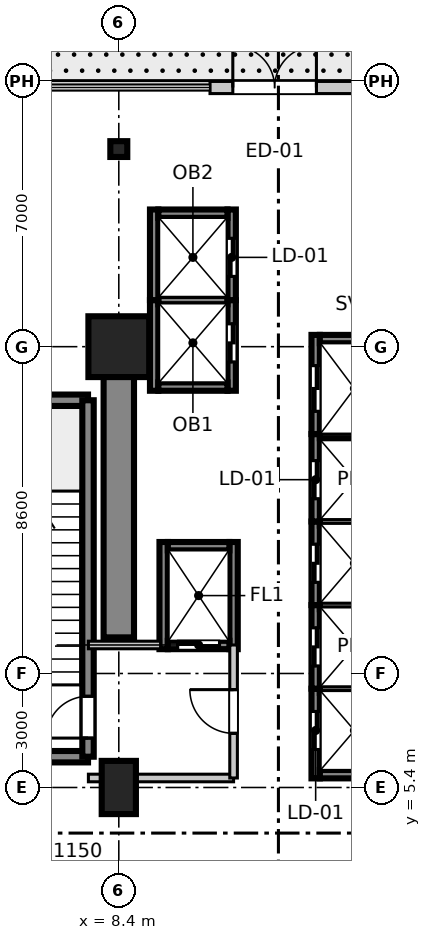
"""IFC4 building model, lengths in metres.
Left out: names, types, materials, properties, quantities, classifications, styles, units other than length and angle.
Written with IfcOpenShell. Run it as: python <this file> out.ifc"""

import sys

from ifc_helpers import new_model, si_unit, direction, frame, frame_2d, origin, origin_2d, place, context, subcontext, project, spatial, rectangle, i_section, extrude, source, transform, mapped, element, fill, save


model = new_model("IFC4")
c1 = context("Model", 3, precision=1e-05, world=origin(), true_north=direction((0.0, 1.0)))
c2 = subcontext(c1, "Body", "Model", "MODEL_VIEW")
j1 = project(units=[si_unit("LENGTHUNIT", "METRE"), si_unit("PLANEANGLEUNIT", "RADIAN")], contexts=[c1])
p1 = place(None, origin())
s1 = spatial("IfcSite", under=j1, at=p1, CompositionType="ELEMENT")
p2 = place(p1, origin())
s2 = spatial("IfcBuilding", under=s1, at=p2, CompositionType="ELEMENT")
p3 = place(p2, origin())
s3 = spatial("IfcBuildingStorey", under=s2, at=p3, CompositionType="ELEMENT", Elevation=0.0)
m1 = source(origin(), c2, "Body", "SweptSolid", [
    extrude(rectangle(XDim=0.9, YDim=1.4, at=origin_2d()), origin(), (0.0, 0.0, 1.0), 5.355),
])
p4 = place(p3, frame((8.4, 5.4, 0.0), z_axis=(0.0, 0.0, 1.0), x_axis=(1.0, 0.0, 0.0)))
e1 = element("IfcColumn", 1, at=p4, inside=s3, PredefinedType="PILASTER", context=c2, shape_type="MappedRepresentation", body=[
    mapped(m1, transform((0.0, 0.0, 0.0), scale=1.0)),
])
m2 = source(origin(), c2, "Body", "SweptSolid", [
    extrude(rectangle(XDim=1.6, YDim=1.6, at=origin_2d()), origin(), (0.0, 0.0, 1.0), 5.355),
])
p5 = place(p3, frame((8.4, 17.0, 0.0), z_axis=(0.0, 0.0, 1.0), x_axis=(1.0, 0.0, 0.0)))
e2 = element("IfcColumn", 2, at=p5, inside=s3, PredefinedType="COLUMN", context=c2, shape_type="MappedRepresentation", body=[
    mapped(m2, transform((0.0, 0.0, 0.0), scale=1.0)),
])
m3 = source(origin(), c2, "Body", "SweptSolid", [
    extrude(i_section(OverallWidth=0.416, OverallDepth=0.446, WebThickness=0.025, FlangeThickness=0.04, at=origin_2d()), origin(), (0.0, 0.0, 1.0), 5.355),
])
p6 = place(p3, frame((8.4, 22.2, 0.0), z_axis=(0.0, 0.0, 1.0), x_axis=(0.0, 1.0, 0.0)))
e3 = element("IfcColumn", 3, at=p6, inside=s3, PredefinedType="COLUMN", context=c2, shape_type="MappedRepresentation", body=[
    mapped(m3, transform((0.0, 0.0, 0.0), scale=1.0)),
])
m4 = source(origin(), c2, "Body", "SweptSolid", [
    extrude(rectangle(XDim=7.65, YDim=0.8, at=frame_2d((3.825, 0.0))), origin(), (0.0, 0.0, 1.0), 5.08),
])
p7 = place(p3, frame((8.4, 9.35, 0.0), z_axis=(0.0, 0.0, 1.0), x_axis=(0.0, 1.0, 0.0)))
e4 = element("IfcWall", 4, at=p7, inside=s3, PredefinedType="SHEAR", context=c2, shape_type="MappedRepresentation", body=[
    mapped(m4, transform((0.0, 0.0, 0.0), scale=1.0)),
])
m5 = source(origin(), c2, "Body", "SweptSolid", [
    extrude(rectangle(XDim=3.98, YDim=0.3, at=frame_2d((1.99, 0.0))), origin(), (0.0, 0.0, 1.0), 5.08),
])
for number, where, z_axis, x_axis in (
    (5, (3.61, 6.21, 0.0), (0.0, 0.0, 1.0), (1.0, 0.0, 0.0)),
    (6, (3.61, 15.59, 0.0), (0.0, 0.0, 1.0), (1.0, 0.0, 0.0)),
):
    element("IfcWall", number, at=place(p3, frame(where, z_axis=z_axis, x_axis=x_axis)), inside=s3, PredefinedType="SHEAR", context=c2, shape_type="MappedRepresentation", body=[
        mapped(m5, transform((0.0, 0.0, 0.0), scale=1.0)),
    ])
m6 = source(origin(), c2, "Body", "SweptSolid", [
    extrude(rectangle(XDim=9.38, YDim=0.3, at=frame_2d((4.69, 0.0))), origin(), (0.0, 0.0, 1.0), 5.08),
])
p8 = place(p3, frame((7.59, 6.21, 0.0), z_axis=(0.0, 0.0, 1.0), x_axis=(0.0, 1.0, 0.0)))
e7 = element("IfcWall", 7, at=p8, inside=s3, PredefinedType="SHEAR", context=c2, shape_type="MappedRepresentation", body=[
    mapped(m6, transform((0.0, 0.0, 0.0), scale=1.0)),
])
p9 = place(p8, frame((0.49, 0.0, 0.0)))
e8 = element("IfcOpeningElement", 8, at=p9, cuts=e7, PredefinedType="OPENING", context=c2, shape_type="SweptSolid", body=[
    extrude(rectangle(XDim=1.1, YDim=2.15, at=frame_2d((0.55, 1.075))), frame((0.0, 0.16, 0.0), z_axis=(0.0, -1.0, 0.0), x_axis=(1.0, 0.0, 0.0)), (0.0, 0.0, 1.0), 0.32),
])
m7 = source(origin(), c2, "Body", "SweptSolid", [
    extrude(rectangle(XDim=2.36, YDim=0.22, at=frame_2d((1.18, 0.0))), origin(), (0.0, 0.0, 1.0), 5.08),
])
p10 = place(p3, frame((13.58, 5.64, 0.0), z_axis=(0.0, 0.0, 1.0), x_axis=(0.0, 1.0, 0.0)))
e9 = element("IfcWall", 9, at=p10, inside=s3, PredefinedType="SHEAR", context=c2, shape_type="MappedRepresentation", body=[
    mapped(m7, transform((0.0, 0.0, 0.0), scale=1.0)),
])
p11 = place(p10, frame((0.76, 0.0, 0.0)))
e10 = element("IfcOpeningElement", 10, at=p11, cuts=e9, PredefinedType="OPENING", context=c2, shape_type="SweptSolid", body=[
    extrude(rectangle(XDim=1.0, YDim=2.2, at=frame_2d((0.5, 1.1))), frame((0.0, 0.12, 0.0), z_axis=(0.0, -1.0, 0.0), x_axis=(1.0, 0.0, 0.0)), (0.0, 0.0, 1.0), 0.24),
])
m8 = source(origin(), c2, "Body", "SweptSolid", [
    extrude(rectangle(XDim=1.82, YDim=0.22, at=frame_2d((0.91, 0.0))), origin(), (0.0, 0.0, 1.0), 5.08),
])
p12 = place(p3, frame((13.69, 5.75, 0.0), z_axis=(0.0, 0.0, 1.0), x_axis=(1.0, 0.0, 0.0)))
e11 = element("IfcWall", 11, at=p12, inside=s3, PredefinedType="SHEAR", context=c2, shape_type="MappedRepresentation", body=[
    mapped(m8, transform((0.0, 0.0, 0.0), scale=1.0)),
])
m9 = source(origin(), c2, "Body", "SweptSolid", [
    extrude(rectangle(XDim=1.82, YDim=0.22, at=frame_2d((0.91, 0.0))), origin(), (0.0, 0.0, 1.0), 5.4),
])
p13 = place(p3, frame((13.69, 8.0, 0.0), z_axis=(0.0, 0.0, 1.0), x_axis=(1.0, 0.0, 0.0)))
e12 = element("IfcWall", 12, at=p13, inside=s3, PredefinedType="SHEAR", context=c2, shape_type="MappedRepresentation", body=[
    mapped(m9, transform((0.0, 0.0, 0.0), scale=1.0)),
])
m10 = source(origin(), c2, "Body", "SweptSolid", [
    extrude(rectangle(XDim=2.2, YDim=0.22, at=frame_2d((1.1, 0.0))), origin(), (0.0, 0.0, 1.0), 5.08),
])
p14 = place(p3, frame((13.58, 8.0, 0.0), z_axis=(0.0, 0.0, 1.0), x_axis=(0.0, 1.0, 0.0)))
e13 = element("IfcWall", 13, at=p14, inside=s3, PredefinedType="SHEAR", context=c2, shape_type="MappedRepresentation", body=[
    mapped(m10, transform((0.0, 0.0, 0.0), scale=1.0)),
])
p15 = place(p14, frame((0.6, 0.0, 0.0)))
e14 = element("IfcOpeningElement", 14, at=p15, cuts=e13, PredefinedType="OPENING", context=c2, shape_type="SweptSolid", body=[
    extrude(rectangle(XDim=1.0, YDim=2.2, at=frame_2d((0.5, 1.1))), frame((0.0, 0.12, 0.0), z_axis=(0.0, -1.0, 0.0), x_axis=(1.0, 0.0, 0.0)), (0.0, 0.0, 1.0), 0.24),
])
p16 = place(p3, frame((13.69, 10.2, 0.0), z_axis=(0.0, 0.0, 1.0), x_axis=(1.0, 0.0, 0.0)))
e15 = element("IfcWall", 15, at=p16, inside=s3, PredefinedType="SHEAR", context=c2, shape_type="MappedRepresentation", body=[
    mapped(m9, transform((0.0, 0.0, 0.0), scale=1.0)),
])
p17 = place(p3, frame((13.58, 10.2, 0.0), z_axis=(0.0, 0.0, 1.0), x_axis=(0.0, 1.0, 0.0)))
e16 = element("IfcWall", 16, at=p17, inside=s3, PredefinedType="SHEAR", context=c2, shape_type="MappedRepresentation", body=[
    mapped(m10, transform((0.0, 0.0, 0.0), scale=1.0)),
])
p18 = place(p17, frame((0.6, 0.0, 0.0)))
e17 = element("IfcOpeningElement", 17, at=p18, cuts=e16, PredefinedType="OPENING", context=c2, shape_type="SweptSolid", body=[
    extrude(rectangle(XDim=1.0, YDim=2.2, at=frame_2d((0.5, 1.1))), frame((0.0, 0.12, 0.0), z_axis=(0.0, -1.0, 0.0), x_axis=(1.0, 0.0, 0.0)), (0.0, 0.0, 1.0), 0.24),
])
p19 = place(p3, frame((13.69, 12.4, 0.0), z_axis=(0.0, 0.0, 1.0), x_axis=(1.0, 0.0, 0.0)))
e18 = element("IfcWall", 18, at=p19, inside=s3, PredefinedType="SHEAR", context=c2, shape_type="MappedRepresentation", body=[
    mapped(m9, transform((0.0, 0.0, 0.0), scale=1.0)),
])
m11 = source(origin(), c2, "Body", "SweptSolid", [
    extrude(rectangle(XDim=2.3, YDim=0.22, at=frame_2d((1.15, 0.0))), origin(), (0.0, 0.0, 1.0), 5.08),
])
p20 = place(p3, frame((13.58, 12.4, 0.0), z_axis=(0.0, 0.0, 1.0), x_axis=(0.0, 1.0, 0.0)))
e19 = element("IfcWall", 19, at=p20, inside=s3, PredefinedType="SHEAR", context=c2, shape_type="MappedRepresentation", body=[
    mapped(m11, transform((0.0, 0.0, 0.0), scale=1.0)),
])
p21 = place(p20, frame((0.6, 0.0, 0.0)))
e20 = element("IfcOpeningElement", 20, at=p21, cuts=e19, PredefinedType="OPENING", context=c2, shape_type="SweptSolid", body=[
    extrude(rectangle(XDim=1.0, YDim=2.2, at=frame_2d((0.5, 1.1))), frame((0.0, 0.12, 0.0), z_axis=(0.0, -1.0, 0.0), x_axis=(1.0, 0.0, 0.0)), (0.0, 0.0, 1.0), 0.24),
])
p22 = place(p3, frame((13.69, 14.7, 0.0), z_axis=(0.0, 0.0, 1.0), x_axis=(1.0, 0.0, 0.0)))
e21 = element("IfcWall", 21, at=p22, inside=s3, PredefinedType="SHEAR", context=c2, shape_type="MappedRepresentation", body=[
    mapped(m9, transform((0.0, 0.0, 0.0), scale=1.0)),
])
m12 = source(origin(), c2, "Body", "SweptSolid", [
    extrude(rectangle(XDim=2.385, YDim=0.22, at=frame_2d((1.192, 0.0))), origin(), (0.0, 0.0, 1.0), 5.08),
])
p23 = place(p3, frame((9.33, 15.84, 0.0), z_axis=(0.0, 0.0, 1.0), x_axis=(0.0, 1.0, 0.0)))
e22 = element("IfcWall", 22, at=p23, inside=s3, PredefinedType="SHEAR", context=c2, shape_type="MappedRepresentation", body=[
    mapped(m12, transform((0.0, 0.0, 0.0), scale=1.0)),
])
p24 = place(p3, frame((11.37, 15.84, 0.0), z_axis=(0.0, 0.0, 1.0), x_axis=(0.0, 1.0, 0.0)))
e23 = element("IfcWall", 23, at=p24, inside=s3, PredefinedType="SHEAR", context=c2, shape_type="MappedRepresentation", body=[
    mapped(m12, transform((0.0, 0.0, 0.0), scale=1.0)),
])
p25 = place(p24, frame((0.76, 0.0, 0.0)))
e24 = element("IfcOpeningElement", 24, at=p25, cuts=e23, PredefinedType="OPENING", context=c2, shape_type="SweptSolid", body=[
    extrude(rectangle(XDim=1.0, YDim=2.2, at=frame_2d((0.5, 1.1))), frame((0.0, 0.12, 0.0), z_axis=(0.0, -1.0, 0.0), x_axis=(1.0, 0.0, 0.0)), (0.0, 0.0, 1.0), 0.24),
])
p26 = place(p3, frame((9.44, 15.95, 0.0), z_axis=(0.0, 0.0, 1.0), x_axis=(1.0, 0.0, 0.0)))
e25 = element("IfcWall", 25, at=p26, inside=s3, PredefinedType="SHEAR", context=c2, shape_type="MappedRepresentation", body=[
    mapped(m8, transform((0.0, 0.0, 0.0), scale=1.0)),
])
p27 = place(p3, frame((9.44, 18.225, 0.0), z_axis=(0.0, 0.0, 1.0), x_axis=(1.0, 0.0, 0.0)))
e26 = element("IfcWall", 26, at=p27, inside=s3, PredefinedType="SHEAR", context=c2, shape_type="MappedRepresentation", body=[
    mapped(m9, transform((0.0, 0.0, 0.0), scale=1.0)),
])
p28 = place(p3, frame((9.33, 18.225, 0.0), z_axis=(0.0, 0.0, 1.0), x_axis=(0.0, 1.0, 0.0)))
e27 = element("IfcWall", 27, at=p28, inside=s3, PredefinedType="SHEAR", context=c2, shape_type="MappedRepresentation", body=[
    mapped(m12, transform((0.0, 0.0, 0.0), scale=1.0)),
])
p29 = place(p3, frame((11.37, 18.225, 0.0), z_axis=(0.0, 0.0, 1.0), x_axis=(0.0, 1.0, 0.0)))
e28 = element("IfcWall", 28, at=p29, inside=s3, PredefinedType="SHEAR", context=c2, shape_type="MappedRepresentation", body=[
    mapped(m12, transform((0.0, 0.0, 0.0), scale=1.0)),
])
p30 = place(p29, frame((0.625, 0.0, 0.0)))
e29 = element("IfcOpeningElement", 29, at=p30, cuts=e28, PredefinedType="OPENING", context=c2, shape_type="SweptSolid", body=[
    extrude(rectangle(XDim=1.0, YDim=2.2, at=frame_2d((0.5, 1.1))), frame((0.0, 0.12, 0.0), z_axis=(0.0, -1.0, 0.0), x_axis=(1.0, 0.0, 0.0)), (0.0, 0.0, 1.0), 0.24),
])
p31 = place(p3, frame((9.44, 20.5, 0.0), z_axis=(0.0, 0.0, 1.0), x_axis=(1.0, 0.0, 0.0)))
e30 = element("IfcWall", 30, at=p31, inside=s3, PredefinedType="SHEAR", context=c2, shape_type="MappedRepresentation", body=[
    mapped(m8, transform((0.0, 0.0, 0.0), scale=1.0)),
])
m13 = source(origin(), c2, "Body", "SweptSolid", [
    extrude(rectangle(XDim=2.82, YDim=0.22, at=frame_2d((1.41, 0.0))), origin(), (0.0, 0.0, 1.0), 5.08),
])
for number, where, z_axis, x_axis in (
    (31, (9.58, 9.04, 0.0), (0.0, 0.0, 1.0), (0.0, 1.0, 0.0)),
    (32, (11.42, 9.04, 0.0), (0.0, 0.0, 1.0), (0.0, 1.0, 0.0)),
):
    element("IfcWall", number, at=place(p3, frame(where, z_axis=z_axis, x_axis=x_axis)), inside=s3, PredefinedType="SHEAR", context=c2, shape_type="MappedRepresentation", body=[
        mapped(m13, transform((0.0, 0.0, 0.0), scale=1.0)),
    ])
m14 = source(origin(), c2, "Body", "SweptSolid", [
    extrude(rectangle(XDim=1.62, YDim=0.22, at=frame_2d((0.81, 0.0))), origin(), (0.0, 0.0, 1.0), 5.08),
])
p32 = place(p3, frame((9.69, 9.15, 0.0), z_axis=(0.0, 0.0, 1.0), x_axis=(1.0, 0.0, 0.0)))
e33 = element("IfcWall", 33, at=p32, inside=s3, PredefinedType="SHEAR", context=c2, shape_type="MappedRepresentation", body=[
    mapped(m14, transform((0.0, 0.0, 0.0), scale=1.0)),
])
p33 = place(p32, frame((0.26, 0.0, 0.0)))
e34 = element("IfcOpeningElement", 34, at=p33, cuts=e33, PredefinedType="OPENING", context=c2, shape_type="SweptSolid", body=[
    extrude(rectangle(XDim=1.1, YDim=2.2, at=frame_2d((0.55, 1.1))), frame((0.0, 0.12, 0.0), z_axis=(0.0, -1.0, 0.0), x_axis=(1.0, 0.0, 0.0)), (0.0, 0.0, 1.0), 0.24),
])
p34 = place(p3, frame((9.69, 11.75, 0.0), z_axis=(0.0, 0.0, 1.0), x_axis=(1.0, 0.0, 0.0)))
e35 = element("IfcWall", 35, at=p34, inside=s3, PredefinedType="SHEAR", context=c2, shape_type="MappedRepresentation", body=[
    mapped(m14, transform((0.0, 0.0, 0.0), scale=1.0)),
])
m15 = source(origin(), c2, "Body", "SweptSolid", [
    extrude(rectangle(XDim=2.61, YDim=0.22, at=frame_2d((1.305, 0.0))), origin(), (0.0, 0.0, 1.0), 5.08),
])
p35 = place(p3, frame((13.58, 14.7, 0.0), z_axis=(0.0, 0.0, 1.0), x_axis=(0.0, 1.0, 0.0)))
e36 = element("IfcWall", 36, at=p35, inside=s3, PredefinedType="SHEAR", context=c2, shape_type="MappedRepresentation", body=[
    mapped(m15, transform((0.0, 0.0, 0.0), scale=1.0)),
])
p36 = place(p35, frame((0.6, 0.0, 0.0)))
e37 = element("IfcOpeningElement", 37, at=p36, cuts=e36, PredefinedType="OPENING", context=c2, shape_type="SweptSolid", body=[
    extrude(rectangle(XDim=1.2, YDim=2.2, at=frame_2d((0.6, 1.1))), frame((0.0, 0.12, 0.0), z_axis=(0.0, -1.0, 0.0), x_axis=(1.0, 0.0, 0.0)), (0.0, 0.0, 1.0), 0.24),
])
p37 = place(p3, frame((13.69, 17.2, 0.0), z_axis=(0.0, 0.0, 1.0), x_axis=(1.0, 0.0, 0.0)))
e38 = element("IfcWall", 38, at=p37, inside=s3, PredefinedType="SHEAR", context=c2, shape_type="MappedRepresentation", body=[
    mapped(m8, transform((0.0, 0.0, 0.0), scale=1.0)),
])
m16 = source(origin(), c2, "Body", "SweptSolid", [
    extrude(rectangle(XDim=27.02, YDim=0.32, at=frame_2d((13.51, 0.0))), origin(), (0.0, 0.0, 1.0), 5.08),
])
p38 = place(p3, frame((10.8, 23.82, 0.0), z_axis=(0.0, 0.0, 1.0), x_axis=(1.0, 0.0, 0.0)))
e39 = element("IfcWall", 39, at=p38, inside=s3, PredefinedType="STANDARD", context=c2, shape_type="MappedRepresentation", body=[
    mapped(m16, transform((0.0, 0.0, 0.0), scale=1.0)),
])
p39 = place(p38, frame((0.6, 0.0, 0.0)))
e40 = element("IfcOpeningElement", 40, at=p39, cuts=e39, PredefinedType="OPENING", context=c2, shape_type="SweptSolid", body=[
    extrude(rectangle(XDim=2.2, YDim=2.6, at=frame_2d((1.1, 1.3))), frame((0.0, 0.17, 0.0), z_axis=(0.0, -1.0, 0.0), x_axis=(1.0, 0.0, 0.0)), (0.0, 0.0, 1.0), 0.34),
])
p40 = place(p38, frame((14.85, 0.0, 0.0)))
e41 = element("IfcOpeningElement", 41, at=p40, cuts=e39, PredefinedType="OPENING", context=c2, shape_type="SweptSolid", body=[
    extrude(rectangle(XDim=2.2, YDim=2.6, at=frame_2d((1.1, 1.3))), frame((0.0, 0.17, 0.0), z_axis=(0.0, -1.0, 0.0), x_axis=(1.0, 0.0, 0.0)), (0.0, 0.0, 1.0), 0.34),
])
m17 = source(origin(), c2, "Body", "SweptSolid", [
    extrude(rectangle(XDim=3.82, YDim=0.2, at=frame_2d((1.91, 0.0))), origin(), (0.0, 0.0, 1.0), 3.4),
])
p41 = place(p3, frame((7.6, 5.65, 0.0), z_axis=(0.0, 0.0, 1.0), x_axis=(1.0, 0.0, 0.0)))
e42 = element("IfcWall", 42, at=p41, inside=s3, PredefinedType="PARTITIONING", context=c2, shape_type="MappedRepresentation", body=[
    mapped(m17, transform((0.0, 0.0, 0.0), scale=1.0)),
])
m18 = source(origin(), c2, "Body", "SweptSolid", [
    extrude(rectangle(XDim=1.9, YDim=0.2, at=frame_2d((0.95, 0.0))), origin(), (0.0, 0.0, 1.0), 3.4),
])
p42 = place(p3, frame((7.6, 9.15, 0.0), z_axis=(0.0, 0.0, 1.0), x_axis=(1.0, 0.0, 0.0)))
e43 = element("IfcWall", 43, at=p42, inside=s3, PredefinedType="PARTITIONING", context=c2, shape_type="MappedRepresentation", body=[
    mapped(m18, transform((0.0, 0.0, 0.0), scale=1.0)),
])
m19 = source(origin(), c2, "Body", "SweptSolid", [
    extrude(rectangle(XDim=3.5, YDim=0.2, at=frame_2d((1.75, 0.0))), origin(), (0.0, 0.0, 1.0), 3.4),
])
p43 = place(p3, frame((11.42, 5.65, 0.0), z_axis=(0.0, 0.0, 1.0), x_axis=(0.0, 1.0, 0.0)))
e44 = element("IfcWall", 44, at=p43, inside=s3, PredefinedType="PARTITIONING", context=c2, shape_type="MappedRepresentation", body=[
    mapped(m19, transform((0.0, 0.0, 0.0), scale=1.0)),
])
p44 = place(p43, frame((1.175, 0.0, 0.0)))
e45 = element("IfcOpeningElement", 45, at=p44, cuts=e44, PredefinedType="OPENING", context=c2, shape_type="SweptSolid", body=[
    extrude(rectangle(XDim=1.15, YDim=2.15, at=frame_2d((0.575, 1.075))), frame((0.0, 0.11, 0.0), z_axis=(0.0, -1.0, 0.0), x_axis=(1.0, 0.0, 0.0)), (0.0, 0.0, 1.0), 0.22),
])
m20 = source(origin(), c2, "Body", "SweptSolid", [
    extrude(rectangle(XDim=1.1, YDim=2.15, at=frame_2d((0.55, 1.075))), frame((0.0, 0.025, 0.0), z_axis=(0.0, -1.0, 0.0), x_axis=(1.0, 0.0, 0.0)), (0.0, 0.0, 1.0), 0.05),
])
p45 = place(p9, frame((1.1, 0.0, 0.0), z_axis=(0.0, 0.0, 1.0), x_axis=(-1.0, 0.0, 0.0)))
e46 = element("IfcDoor", 46, at=p45, inside=s3, OperationType="SINGLE_SWING_LEFT", PredefinedType="DOOR", context=c2, shape_type="MappedRepresentation", body=[
    mapped(m20, transform((0.0, 0.0, 0.0), scale=1.0)),
])
fill(e8, e46)
m21 = source(origin(), c2, "Body", "SweptSolid", [
    extrude(rectangle(XDim=1.0, YDim=2.2, at=frame_2d((0.5, 1.1))), frame((0.0, 0.025, 0.0), z_axis=(0.0, -1.0, 0.0), x_axis=(1.0, 0.0, 0.0)), (0.0, 0.0, 1.0), 0.05),
])
p46 = place(p11, origin())
e47 = element("IfcDoor", 47, at=p46, inside=s3, OperationType="DOUBLE_DOOR_SLIDING", PredefinedType="DOOR", context=c2, shape_type="MappedRepresentation", body=[
    mapped(m21, transform((0.0, 0.0, 0.0), scale=1.0)),
])
fill(e10, e47)
p47 = place(p15, origin())
e48 = element("IfcDoor", 48, at=p47, inside=s3, OperationType="DOUBLE_DOOR_SLIDING", PredefinedType="DOOR", context=c2, shape_type="MappedRepresentation", body=[
    mapped(m21, transform((0.0, 0.0, 0.0), scale=1.0)),
])
fill(e14, e48)
p48 = place(p18, origin())
e49 = element("IfcDoor", 49, at=p48, inside=s3, OperationType="DOUBLE_DOOR_SLIDING", PredefinedType="DOOR", context=c2, shape_type="MappedRepresentation", body=[
    mapped(m21, transform((0.0, 0.0, 0.0), scale=1.0)),
])
fill(e17, e49)
p49 = place(p21, origin())
e50 = element("IfcDoor", 50, at=p49, inside=s3, OperationType="DOUBLE_DOOR_SLIDING", PredefinedType="DOOR", context=c2, shape_type="MappedRepresentation", body=[
    mapped(m21, transform((0.0, 0.0, 0.0), scale=1.0)),
])
fill(e20, e50)
p50 = place(p25, frame((1.0, 0.0, 0.0), z_axis=(0.0, 0.0, 1.0), x_axis=(-1.0, 0.0, 0.0)))
e51 = element("IfcDoor", 51, at=p50, inside=s3, OperationType="DOUBLE_DOOR_SLIDING", PredefinedType="DOOR", context=c2, shape_type="MappedRepresentation", body=[
    mapped(m21, transform((0.0, 0.0, 0.0), scale=1.0)),
])
fill(e24, e51)
p51 = place(p30, frame((1.0, 0.0, 0.0), z_axis=(0.0, 0.0, 1.0), x_axis=(-1.0, 0.0, 0.0)))
e52 = element("IfcDoor", 52, at=p51, inside=s3, OperationType="DOUBLE_DOOR_SLIDING", PredefinedType="DOOR", context=c2, shape_type="MappedRepresentation", body=[
    mapped(m21, transform((0.0, 0.0, 0.0), scale=1.0)),
])
fill(e29, e52)
m22 = source(origin(), c2, "Body", "SweptSolid", [
    extrude(rectangle(XDim=1.1, YDim=2.2, at=frame_2d((0.55, 1.1))), frame((0.0, 0.025, 0.0), z_axis=(0.0, -1.0, 0.0), x_axis=(1.0, 0.0, 0.0)), (0.0, 0.0, 1.0), 0.05),
])
p52 = place(p33, frame((1.1, 0.0, 0.0), z_axis=(0.0, 0.0, 1.0), x_axis=(-1.0, 0.0, 0.0)))
e53 = element("IfcDoor", 53, at=p52, inside=s3, OperationType="DOUBLE_DOOR_SLIDING", PredefinedType="DOOR", context=c2, shape_type="MappedRepresentation", body=[
    mapped(m22, transform((0.0, 0.0, 0.0), scale=1.0)),
])
fill(e34, e53)
m23 = source(origin(), c2, "Body", "SweptSolid", [
    extrude(rectangle(XDim=1.2, YDim=2.2, at=frame_2d((0.6, 1.1))), frame((0.0, 0.025, 0.0), z_axis=(0.0, -1.0, 0.0), x_axis=(1.0, 0.0, 0.0)), (0.0, 0.0, 1.0), 0.05),
])
p53 = place(p36, origin())
e54 = element("IfcDoor", 54, at=p53, inside=s3, OperationType="DOUBLE_DOOR_SLIDING", PredefinedType="DOOR", context=c2, shape_type="MappedRepresentation", body=[
    mapped(m23, transform((0.0, 0.0, 0.0), scale=1.0)),
])
fill(e37, e54)
m24 = source(origin(), c2, "Body", "SweptSolid", [
    extrude(rectangle(XDim=2.2, YDim=2.6, at=frame_2d((1.1, 1.3))), frame((0.0, 0.025, 0.0), z_axis=(0.0, -1.0, 0.0), x_axis=(1.0, 0.0, 0.0)), (0.0, 0.0, 1.0), 0.05),
])
p54 = place(p39, origin())
e55 = element("IfcDoor", 55, at=p54, inside=s3, OperationType="DOUBLE_DOOR_SINGLE_SWING", PredefinedType="DOOR", context=c2, shape_type="MappedRepresentation", body=[
    mapped(m24, transform((0.0, 0.0, 0.0), scale=1.0)),
])
fill(e40, e55)
m25 = source(origin(), c2, "Body", "SweptSolid", [
    extrude(rectangle(XDim=1.15, YDim=2.15, at=frame_2d((0.575, 1.075))), frame((0.0, 0.025, 0.0), z_axis=(0.0, -1.0, 0.0), x_axis=(1.0, 0.0, 0.0)), (0.0, 0.0, 1.0), 0.05),
])
p55 = place(p44, frame((1.15, 0.0, 0.0), z_axis=(0.0, 0.0, 1.0), x_axis=(-1.0, 0.0, 0.0)))
e56 = element("IfcDoor", 56, at=p55, inside=s3, OperationType="SINGLE_SWING_RIGHT", PredefinedType="DOOR", context=c2, shape_type="MappedRepresentation", body=[
    mapped(m25, transform((0.0, 0.0, 0.0), scale=1.0)),
])
fill(e45, e56)
save(model, sys.argv[1])
